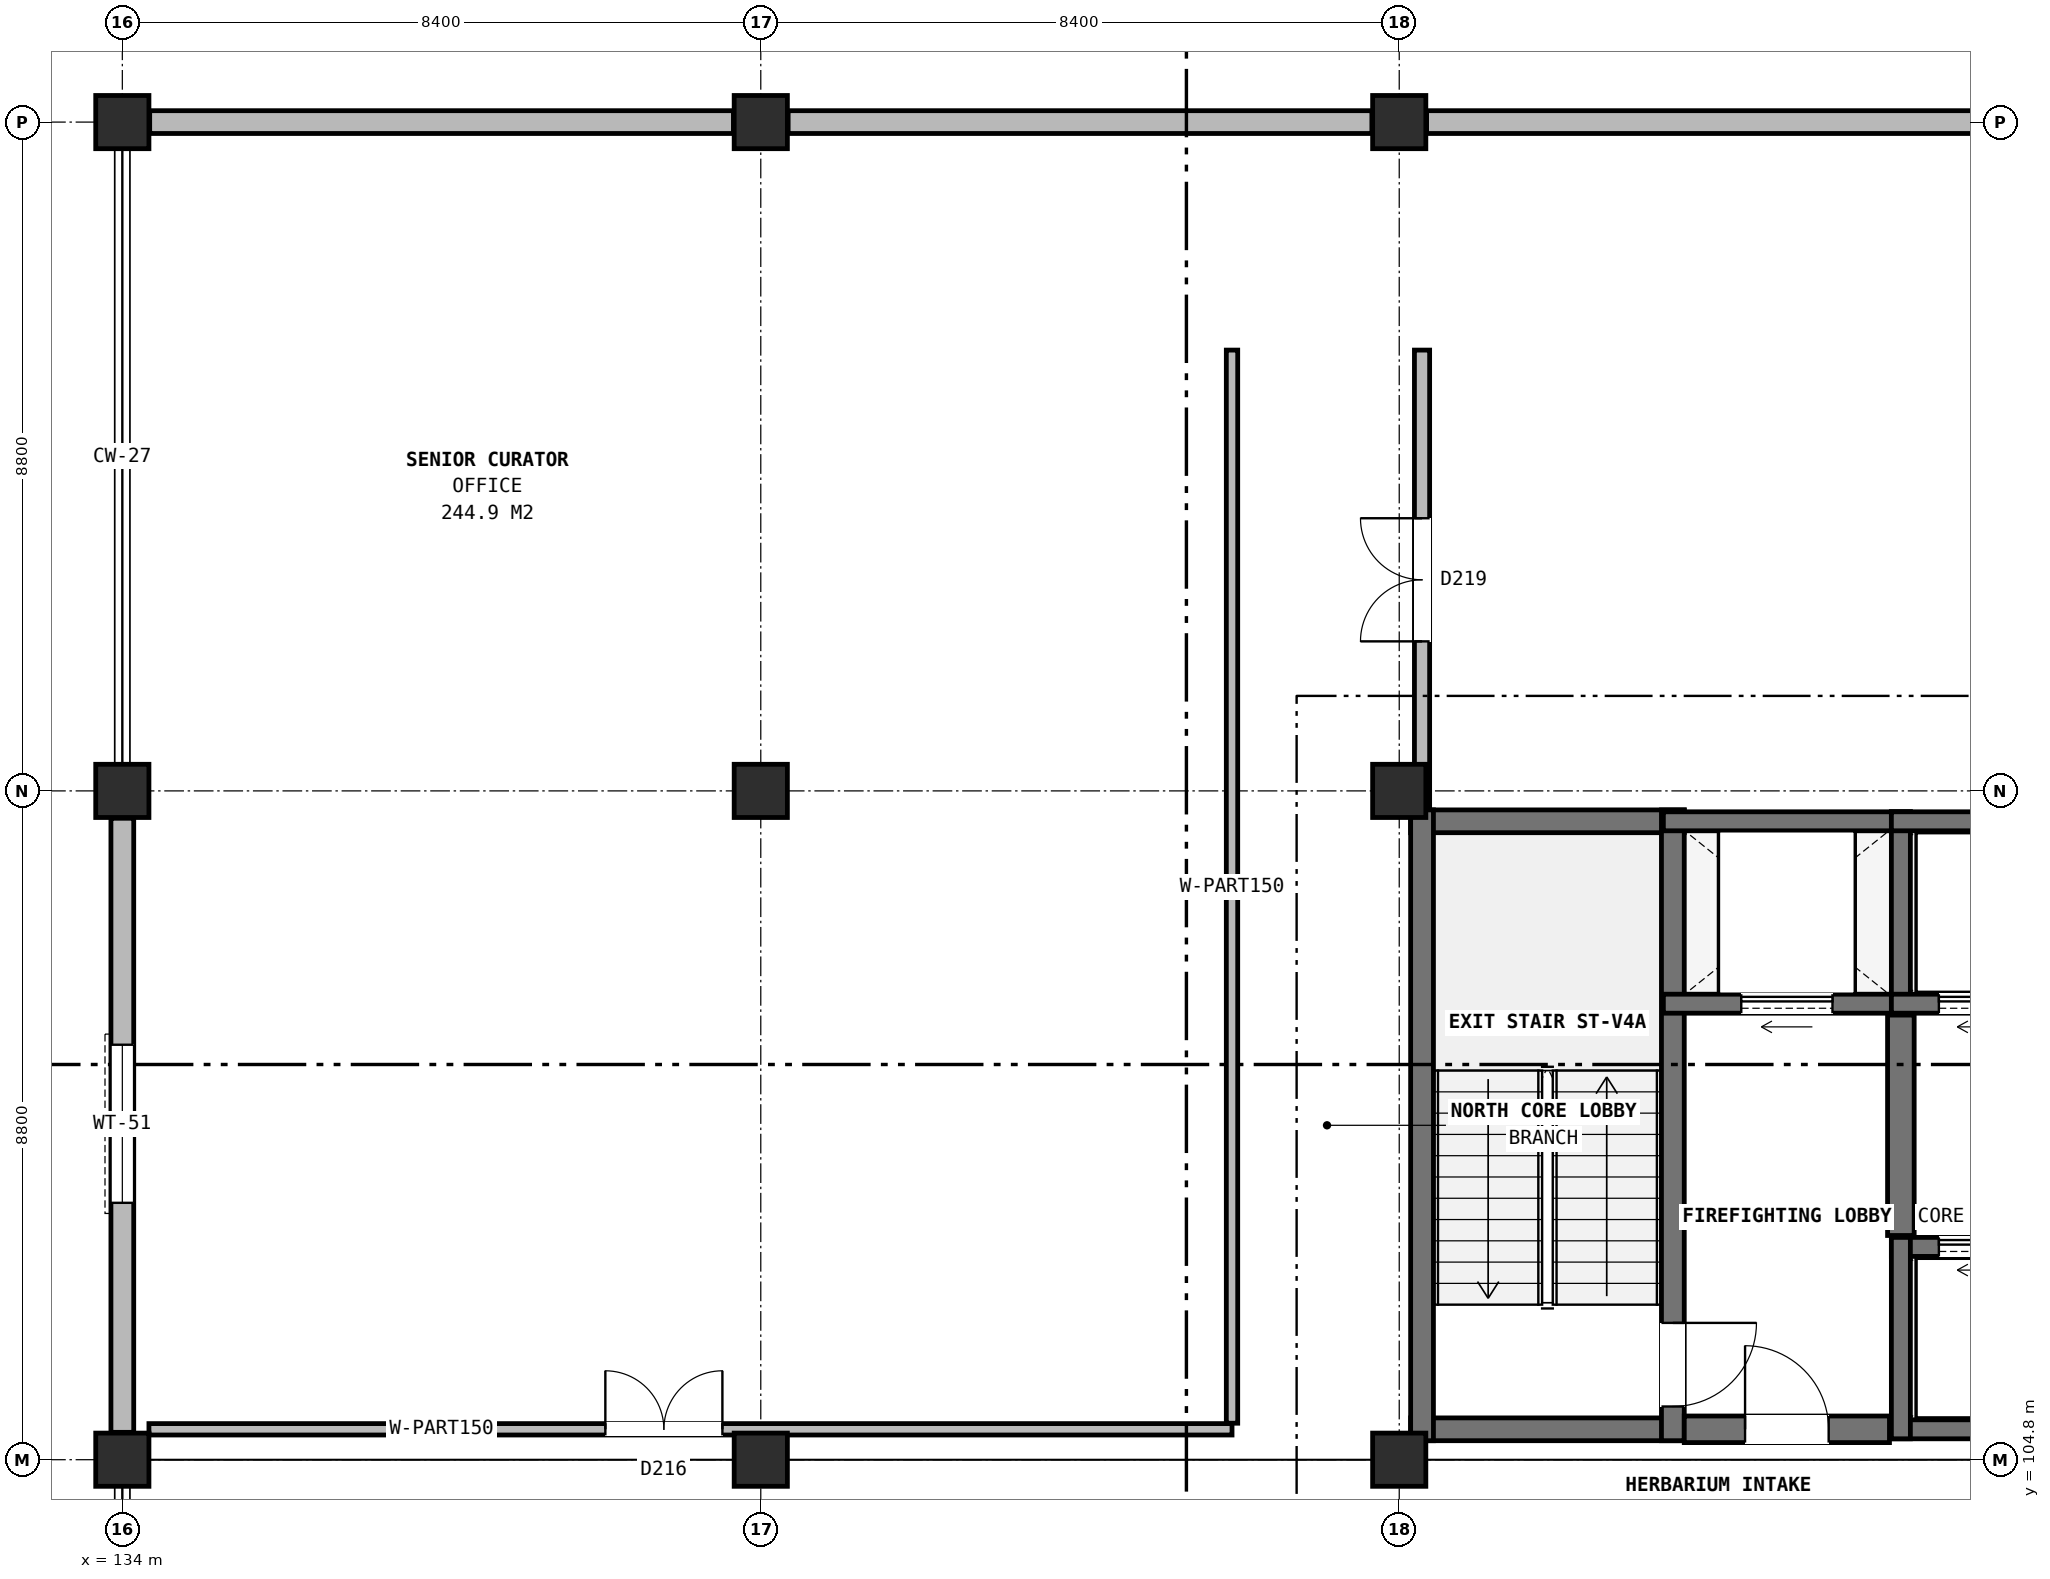
"""IFC4 building model, lengths in metres.
Left out: names, types, materials, properties, quantities, classifications, styles, units other than length and angle.
Written with IfcOpenShell. Run it as: python <this file> out.ifc"""

import sys

from ifc_helpers import new_model, si_unit, direction, frame, frame_2d, origin, origin_2d, place, context, subcontext, project, spatial, rectangle, extrude, element, fill, save


model = new_model("IFC4")
c1 = context("Model", 3, precision=1e-05, world=origin(), true_north=direction((0.0, 1.0)))
c2 = subcontext(c1, "Body", "Model", "MODEL_VIEW")
j1 = project(units=[si_unit("LENGTHUNIT", "METRE"), si_unit("PLANEANGLEUNIT", "RADIAN")], contexts=[c1])
p1 = place(None, origin())
s1 = spatial("IfcSite", under=j1, at=p1, CompositionType="ELEMENT")
p2 = place(p1, origin())
s2 = spatial("IfcBuilding", under=s1, at=p2, CompositionType="ELEMENT")
p3 = place(p2, frame((0.0, 0.0, 24.8)))
s3 = spatial("IfcBuildingStorey", under=s2, at=p3, CompositionType="ELEMENT", Elevation=24.8)
for number, where, z_axis, x_axis in (
    (1, (134.0, 104.8, 0.0), (0.0, 0.0, 1.0), (1.0, 0.0, 0.0)),
    (2, (134.0, 113.6, 0.0), (0.0, 0.0, 1.0), (1.0, 0.0, 0.0)),
    (3, (134.0, 122.4, 0.0), (0.0, 0.0, 1.0), (1.0, 0.0, 0.0)),
    (4, (142.4, 104.8, 0.0), (0.0, 0.0, 1.0), (1.0, 0.0, 0.0)),
    (5, (142.4, 113.6, 0.0), (0.0, 0.0, 1.0), (1.0, 0.0, 0.0)),
    (6, (142.4, 122.4, 0.0), (0.0, 0.0, 1.0), (1.0, 0.0, 0.0)),
    (7, (150.8, 104.8, 0.0), (0.0, 0.0, 1.0), (1.0, 0.0, 0.0)),
    (8, (150.8, 113.6, 0.0), (0.0, 0.0, 1.0), (1.0, 0.0, 0.0)),
    (9, (150.8, 122.4, 0.0), (0.0, 0.0, 1.0), (1.0, 0.0, 0.0)),
):
    element("IfcColumn", number, at=place(p3, frame(where, z_axis=z_axis, x_axis=x_axis)), inside=s3, PredefinedType="COLUMN", context=c2, shape_type="SweptSolid", body=[
        extrude(rectangle(XDim=0.7, YDim=0.7, at=origin_2d()), origin(), (0.0, 0.0, 1.0), 4.0),
    ])
p4 = place(p3, frame((158.84, 122.4, 0.0), z_axis=(0.0, 0.0, 1.0), x_axis=(-1.0, 0.0, 0.0)))
e10 = element("IfcWall", 10, at=p4, inside=s3, PredefinedType="SOLIDWALL", context=c2, shape_type="SweptSolid", body=[
    extrude(rectangle(XDim=7.68, YDim=0.3, at=frame_2d((3.84, 0.0))), origin(), (0.0, 0.0, 1.0), 3.15),
])
for number, where, z_axis, x_axis in (
    (11, (150.44, 122.4, 0.0), (0.0, 0.0, 1.0), (-1.0, 0.0, 0.0)),
    (12, (142.04, 122.4, 0.0), (0.0, 0.0, 1.0), (-1.0, 0.0, 0.0)),
):
    element("IfcWall", number, at=place(p3, frame(where, z_axis=z_axis, x_axis=x_axis)), inside=s3, PredefinedType="SOLIDWALL", context=c2, shape_type="SweptSolid", body=[
        extrude(rectangle(XDim=7.68, YDim=0.3, at=frame_2d((3.84, 0.0))), origin(), (0.0, 0.0, 1.0), 3.15),
    ])
p5 = place(p3, frame((134.0, 113.24, 0.0), z_axis=(0.0, 0.0, 1.0), x_axis=(0.0, -1.0, 0.0)))
e13 = element("IfcWall", 13, at=p5, inside=s3, PredefinedType="SOLIDWALL", context=c2, shape_type="SweptSolid", body=[
    extrude(rectangle(XDim=8.08, YDim=0.3, at=frame_2d((4.04, 0.0))), origin(), (0.0, 0.0, 1.0), 3.15),
])
p6 = place(p5, frame((2.98, 0.0, 0.9)))
e14 = element("IfcOpeningElement", 14, at=p6, cuts=e13, PredefinedType="OPENING", context=c2, shape_type="SweptSolid", body=[
    extrude(rectangle(XDim=2.08, YDim=2.04, at=frame_2d((1.04, 1.02))), frame((0.0, 0.16, 0.0), z_axis=(0.0, -1.0, 0.0), x_axis=(1.0, 0.0, 0.0)), (0.0, 0.0, 1.0), 0.32),
])
for number, where, z_axis, x_axis in (
    (15, (150.95, 105.2, 0.0), (0.0, 0.0, 1.0), (1.0, 0.0, 0.0)),
    (16, (150.95, 113.2, 0.0), (0.0, 0.0, 1.0), (1.0, 0.0, 0.0)),
):
    element("IfcWall", number, at=place(p3, frame(where, z_axis=z_axis, x_axis=x_axis)), inside=s3, PredefinedType="SHEAR", context=c2, shape_type="SweptSolid", body=[
        extrude(rectangle(XDim=3.6, YDim=0.3, at=frame_2d((1.8, 0.0))), origin(), (0.0, 0.0, 1.0), 4.0),
    ])
p7 = place(p3, frame((151.1, 105.05, 0.0), z_axis=(0.0, 0.0, 1.0), x_axis=(0.0, 1.0, 0.0)))
e17 = element("IfcWall", 17, at=p7, inside=s3, PredefinedType="SHEAR", context=c2, shape_type="SweptSolid", body=[
    extrude(rectangle(XDim=8.3, YDim=0.3, at=frame_2d((4.15, 0.0))), origin(), (0.0, 0.0, 1.0), 4.0),
])
p8 = place(p3, frame((154.4, 105.05, 0.0), z_axis=(0.0, 0.0, 1.0), x_axis=(0.0, 1.0, 0.0)))
e18 = element("IfcWall", 18, at=p8, inside=s3, PredefinedType="SHEAR", context=c2, shape_type="SweptSolid", body=[
    extrude(rectangle(XDim=8.3, YDim=0.3, at=frame_2d((4.15, 0.0))), origin(), (0.0, 0.0, 1.0), 4.0),
])
p9 = place(p8, frame((0.45, 0.0, 0.0)))
e19 = element("IfcOpeningElement", 19, at=p9, cuts=e18, PredefinedType="OPENING", context=c2, shape_type="SweptSolid", body=[
    extrude(rectangle(XDim=1.1, YDim=2.2, at=frame_2d((0.55, 1.1))), frame((0.0, 0.16, 0.0), z_axis=(0.0, -1.0, 0.0), x_axis=(1.0, 0.0, 0.0)), (0.0, 0.0, 1.0), 0.32),
])
p10 = place(p3, frame((154.275, 110.8, 0.0), z_axis=(0.0, 0.0, 1.0), x_axis=(1.0, 0.0, 0.0)))
e20 = element("IfcWall", 20, at=p10, inside=s3, PredefinedType="SOLIDWALL", context=c2, shape_type="SweptSolid", body=[
    extrude(rectangle(XDim=3.25, YDim=0.25, at=frame_2d((1.625, 0.0))), origin(), (0.0, 0.0, 1.0), 3.68),
])
p11 = place(p10, frame((1.025, 0.0, 0.0)))
e21 = element("IfcOpeningElement", 21, at=p11, cuts=e20, PredefinedType="OPENING", context=c2, shape_type="SweptSolid", body=[
    extrude(rectangle(XDim=1.2, YDim=2.2, at=frame_2d((0.6, 1.1))), frame((0.0, 0.135, 0.0), z_axis=(0.0, -1.0, 0.0), x_axis=(1.0, 0.0, 0.0)), (0.0, 0.0, 1.0), 0.27),
])
p12 = place(p3, frame((154.275, 113.2, 0.0), z_axis=(0.0, 0.0, 1.0), x_axis=(1.0, 0.0, 0.0)))
e22 = element("IfcWall", 22, at=p12, inside=s3, PredefinedType="SOLIDWALL", context=c2, shape_type="SweptSolid", body=[
    extrude(rectangle(XDim=3.25, YDim=0.25, at=frame_2d((1.625, 0.0))), origin(), (0.0, 0.0, 1.0), 3.68),
])
p13 = place(p3, frame((157.4, 110.675, 0.0), z_axis=(0.0, 0.0, 1.0), x_axis=(0.0, 1.0, 0.0)))
e23 = element("IfcWall", 23, at=p13, inside=s3, PredefinedType="SOLIDWALL", context=c2, shape_type="SweptSolid", body=[
    extrude(rectangle(XDim=2.65, YDim=0.25, at=frame_2d((1.325, 0.0))), origin(), (0.0, 0.0, 1.0), 3.68),
])
p14 = place(p3, frame((157.275, 110.8, 0.0), z_axis=(0.0, 0.0, 1.0), x_axis=(1.0, 0.0, 0.0)))
e24 = element("IfcWall", 24, at=p14, inside=s3, PredefinedType="SOLIDWALL", context=c2, shape_type="SweptSolid", body=[
    extrude(rectangle(XDim=2.35, YDim=0.25, at=frame_2d((1.175, 0.0))), origin(), (0.0, 0.0, 1.0), 3.68),
])
p15 = place(p14, frame((0.625, 0.0, 0.0)))
e25 = element("IfcOpeningElement", 25, at=p15, cuts=e24, PredefinedType="OPENING", context=c2, shape_type="SweptSolid", body=[
    extrude(rectangle(XDim=1.1, YDim=2.2, at=frame_2d((0.55, 1.1))), frame((0.0, 0.135, 0.0), z_axis=(0.0, -1.0, 0.0), x_axis=(1.0, 0.0, 0.0)), (0.0, 0.0, 1.0), 0.27),
])
for number, where, z_axis, x_axis in (
    (26, (157.275, 113.2, 0.0), (0.0, 0.0, 1.0), (1.0, 0.0, 0.0)),
    (27, (157.275, 105.2, 0.0), (0.0, 0.0, 1.0), (1.0, 0.0, 0.0)),
):
    element("IfcWall", number, at=place(p3, frame(where, z_axis=z_axis, x_axis=x_axis)), inside=s3, PredefinedType="SOLIDWALL", context=c2, shape_type="SweptSolid", body=[
        extrude(rectangle(XDim=2.35, YDim=0.25, at=frame_2d((1.175, 0.0))), origin(), (0.0, 0.0, 1.0), 3.68),
    ])
p16 = place(p3, frame((157.275, 107.6, 0.0), z_axis=(0.0, 0.0, 1.0), x_axis=(1.0, 0.0, 0.0)))
e28 = element("IfcWall", 28, at=p16, inside=s3, PredefinedType="SOLIDWALL", context=c2, shape_type="SweptSolid", body=[
    extrude(rectangle(XDim=2.35, YDim=0.25, at=frame_2d((1.175, 0.0))), origin(), (0.0, 0.0, 1.0), 3.68),
])
p17 = place(p16, frame((0.625, 0.0, 0.0)))
e29 = element("IfcOpeningElement", 29, at=p17, cuts=e28, PredefinedType="OPENING", context=c2, shape_type="SweptSolid", body=[
    extrude(rectangle(XDim=1.1, YDim=2.2, at=frame_2d((0.55, 1.1))), frame((0.0, 0.135, 0.0), z_axis=(0.0, -1.0, 0.0), x_axis=(1.0, 0.0, 0.0)), (0.0, 0.0, 1.0), 0.27),
])
p18 = place(p3, frame((157.4, 105.075, 0.0), z_axis=(0.0, 0.0, 1.0), x_axis=(0.0, 1.0, 0.0)))
e30 = element("IfcWall", 30, at=p18, inside=s3, PredefinedType="SOLIDWALL", context=c2, shape_type="SweptSolid", body=[
    extrude(rectangle(XDim=2.65, YDim=0.25, at=frame_2d((1.325, 0.0))), origin(), (0.0, 0.0, 1.0), 3.68),
])
p19 = place(p3, frame((157.4, 107.75, 0.0), z_axis=(0.0, 0.0, 1.0), x_axis=(0.0, 1.0, 0.0)))
e31 = element("IfcWall", 31, at=p19, inside=s3, PredefinedType="SHEAR", context=c2, shape_type="SweptSolid", body=[
    extrude(rectangle(XDim=2.9, YDim=0.35, at=frame_2d((1.45, 0.0))), origin(), (0.0, 0.0, 1.0), 3.68),
])
p20 = place(p3, frame((154.55, 105.2, 0.0), z_axis=(0.0, 0.0, 1.0), x_axis=(1.0, 0.0, 0.0)))
e32 = element("IfcWall", 32, at=p20, inside=s3, PredefinedType="SHEAR", context=c2, shape_type="SweptSolid", body=[
    extrude(rectangle(XDim=2.7, YDim=0.35, at=frame_2d((1.35, 0.0))), origin(), (0.0, 0.0, 1.0), 3.68),
])
p21 = place(p20, frame((0.8, 0.0, 0.0)))
e33 = element("IfcOpeningElement", 33, at=p21, cuts=e32, PredefinedType="OPENING", context=c2, shape_type="SweptSolid", body=[
    extrude(rectangle(XDim=1.1, YDim=2.2, at=frame_2d((0.55, 1.1))), frame((0.0, 0.185, 0.0), z_axis=(0.0, -1.0, 0.0), x_axis=(1.0, 0.0, 0.0)), (0.0, 0.0, 1.0), 0.37),
])
p22 = place(p3, frame((134.35, 105.2, 0.0), z_axis=(0.0, 0.0, 1.0), x_axis=(1.0, 0.0, 0.0)))
e34 = element("IfcWall", 34, at=p22, inside=s3, PredefinedType="PARTITIONING", context=c2, shape_type="SweptSolid", body=[
    extrude(rectangle(XDim=14.25, YDim=0.15, at=frame_2d((7.125, 0.0))), origin(), (0.0, 0.0, 1.0), 3.145),
])
p23 = place(p22, frame((6.005, 0.0, 0.0)))
e35 = element("IfcOpeningElement", 35, at=p23, cuts=e34, PredefinedType="OPENING", context=c2, shape_type="SweptSolid", body=[
    extrude(rectangle(XDim=1.54, YDim=2.3, at=frame_2d((0.77, 1.15))), frame((0.0, 0.085, 0.0), z_axis=(0.0, -1.0, 0.0), x_axis=(1.0, 0.0, 0.0)), (0.0, 0.0, 1.0), 0.17),
])
p24 = place(p3, frame((148.6, 105.28, 0.0), z_axis=(0.0, 0.0, 1.0), x_axis=(0.0, 1.0, 0.0)))
e36 = element("IfcWall", 36, at=p24, inside=s3, PredefinedType="PARTITIONING", context=c2, shape_type="SweptSolid", body=[
    extrude(rectangle(XDim=14.12, YDim=0.15, at=frame_2d((7.06, 0.0))), origin(), (0.0, 0.0, 1.0), 3.665),
])
p25 = place(p3, frame((151.1, 113.355, 0.0), z_axis=(0.0, 0.0, 1.0), x_axis=(0.0, 1.0, 0.0)))
e37 = element("IfcWall", 37, at=p25, inside=s3, PredefinedType="PARTITIONING", context=c2, shape_type="SweptSolid", body=[
    extrude(rectangle(XDim=6.045, YDim=0.2, at=frame_2d((3.022, 0.0))), origin(), (0.0, 0.0, 1.0), 3.145),
])
p26 = place(p25, frame((2.212, 0.0, 0.0)))
e38 = element("IfcOpeningElement", 38, at=p26, cuts=e37, PredefinedType="OPENING", context=c2, shape_type="SweptSolid", body=[
    extrude(rectangle(XDim=1.62, YDim=2.25, at=frame_2d((0.81, 1.125))), frame((0.0, 0.11, 0.0), z_axis=(0.0, -1.0, 0.0), x_axis=(1.0, 0.0, 0.0)), (0.0, 0.0, 1.0), 0.22),
])
p27 = place(p6, origin())
e39 = element("IfcWindow", 39, at=p27, inside=s3, PartitioningType="SINGLE_PANEL", PredefinedType="WINDOW", context=c2, shape_type="SweptSolid", body=[
    extrude(rectangle(XDim=2.08, YDim=2.04, at=frame_2d((1.04, 1.02))), frame((0.0, 0.03, 0.0), z_axis=(0.0, -1.0, 0.0), x_axis=(1.0, 0.0, 0.0)), (0.0, 0.0, 1.0), 0.06),
])
fill(e14, e39)
p28 = place(p9, frame((1.1, 0.0, 0.0), z_axis=(0.0, 0.0, 1.0), x_axis=(-1.0, 0.0, 0.0)))
e40 = element("IfcDoor", 40, at=p28, inside=s3, OperationType="SINGLE_SWING_RIGHT", PredefinedType="DOOR", context=c2, shape_type="SweptSolid", body=[
    extrude(rectangle(XDim=1.1, YDim=2.2, at=frame_2d((0.55, 1.1))), frame((0.0, 0.025, 0.0), z_axis=(0.0, -1.0, 0.0), x_axis=(1.0, 0.0, 0.0)), (0.0, 0.0, 1.0), 0.05),
])
fill(e19, e40)
p29 = place(p11, origin())
e41 = element("IfcDoor", 41, at=p29, inside=s3, OperationType="SLIDING_TO_LEFT", PredefinedType="DOOR", context=c2, shape_type="SweptSolid", body=[
    extrude(rectangle(XDim=1.2, YDim=2.2, at=frame_2d((0.6, 1.1))), frame((0.0, 0.025, 0.0), z_axis=(0.0, -1.0, 0.0), x_axis=(1.0, 0.0, 0.0)), (0.0, 0.0, 1.0), 0.05),
])
fill(e21, e41)
p30 = place(p15, origin())
e42 = element("IfcDoor", 42, at=p30, inside=s3, OperationType="SLIDING_TO_LEFT", PredefinedType="DOOR", context=c2, shape_type="SweptSolid", body=[
    extrude(rectangle(XDim=1.1, YDim=2.2, at=frame_2d((0.55, 1.1))), frame((0.0, 0.025, 0.0), z_axis=(0.0, -1.0, 0.0), x_axis=(1.0, 0.0, 0.0)), (0.0, 0.0, 1.0), 0.05),
])
fill(e25, e42)
p31 = place(p17, origin())
e43 = element("IfcDoor", 43, at=p31, inside=s3, OperationType="SLIDING_TO_LEFT", PredefinedType="DOOR", context=c2, shape_type="SweptSolid", body=[
    extrude(rectangle(XDim=1.1, YDim=2.2, at=frame_2d((0.55, 1.1))), frame((0.0, 0.025, 0.0), z_axis=(0.0, -1.0, 0.0), x_axis=(1.0, 0.0, 0.0)), (0.0, 0.0, 1.0), 0.05),
])
fill(e29, e43)
p32 = place(p21, origin())
e44 = element("IfcDoor", 44, at=p32, inside=s3, OperationType="SINGLE_SWING_LEFT", PredefinedType="DOOR", context=c2, shape_type="SweptSolid", body=[
    extrude(rectangle(XDim=1.1, YDim=2.2, at=frame_2d((0.55, 1.1))), frame((0.0, 0.025, 0.0), z_axis=(0.0, -1.0, 0.0), x_axis=(1.0, 0.0, 0.0)), (0.0, 0.0, 1.0), 0.05),
])
fill(e33, e44)
p33 = place(p23, origin())
e45 = element("IfcDoor", 45, at=p33, inside=s3, OperationType="DOUBLE_DOOR_SINGLE_SWING", PredefinedType="DOOR", context=c2, shape_type="SweptSolid", body=[
    extrude(rectangle(XDim=1.54, YDim=2.3, at=frame_2d((0.77, 1.15))), frame((0.0, 0.025, 0.0), z_axis=(0.0, -1.0, 0.0), x_axis=(1.0, 0.0, 0.0)), (0.0, 0.0, 1.0), 0.05),
])
fill(e35, e45)
p34 = place(p26, origin())
e46 = element("IfcDoor", 46, at=p34, inside=s3, OperationType="DOUBLE_DOOR_SINGLE_SWING", PredefinedType="DOOR", context=c2, shape_type="SweptSolid", body=[
    extrude(rectangle(XDim=1.62, YDim=2.25, at=frame_2d((0.81, 1.125))), frame((0.0, 0.025, 0.0), z_axis=(0.0, -1.0, 0.0), x_axis=(1.0, 0.0, 0.0)), (0.0, 0.0, 1.0), 0.05),
])
fill(e38, e46)
save(model, sys.argv[1])
